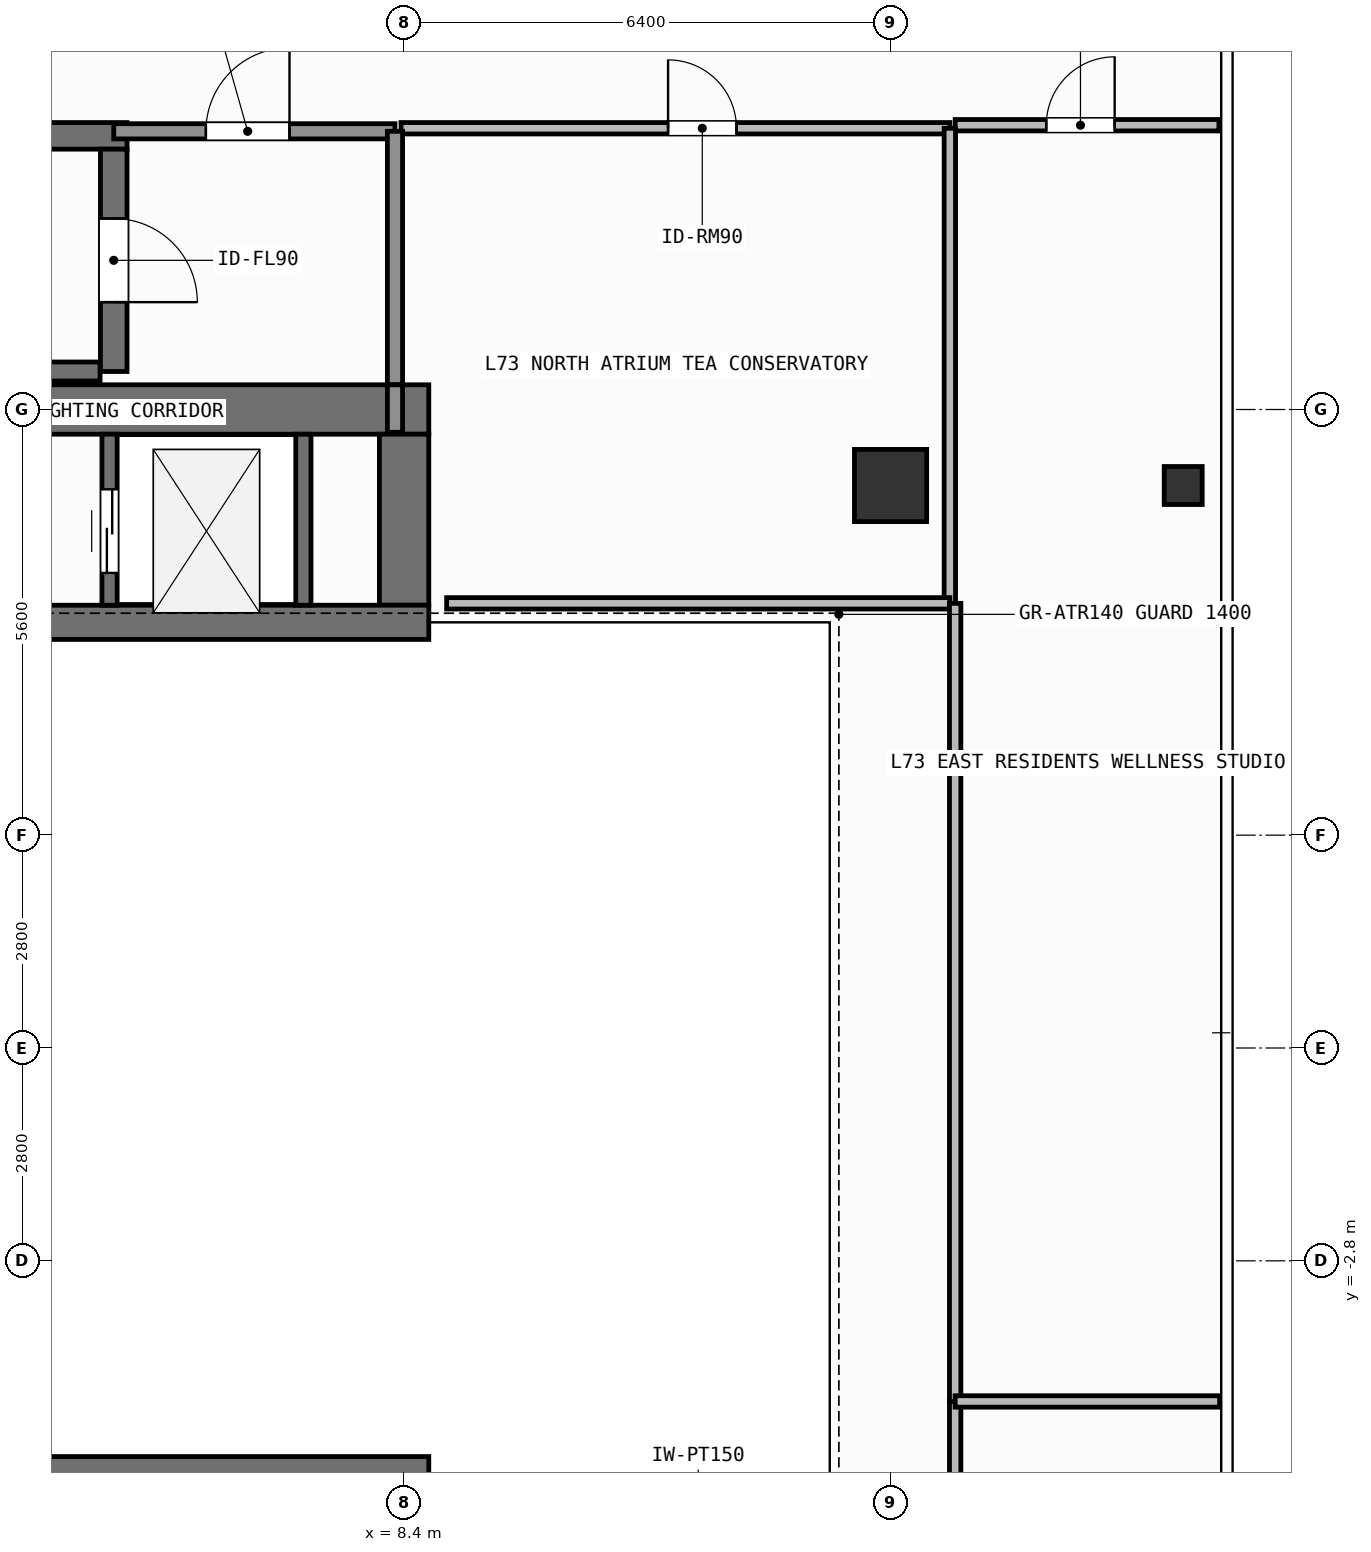
"""IFC4 building model, lengths in metres.
Left out: names, types, materials, properties, quantities, classifications, styles, units other than length and angle.
Written with IfcOpenShell. Run it as: python <this file> out.ifc"""

import sys

from ifc_helpers import new_model, si_unit, direction, frame, frame_2d, origin, origin_2d, place, context, subcontext, project, spatial, rectangle, hollow_rectangle, extrude, element, fill, save


model = new_model("IFC4")
c1 = context("Model", 3, precision=1e-05, world=origin(), true_north=direction((0.0, 1.0)))
c2 = subcontext(c1, "Body", "Model", "MODEL_VIEW")
j1 = project(units=[si_unit("LENGTHUNIT", "METRE"), si_unit("PLANEANGLEUNIT", "RADIAN")], contexts=[c1])
p1 = place(None, origin())
s1 = spatial("IfcSite", under=j1, at=p1, CompositionType="ELEMENT")
p2 = place(p1, origin())
s2 = spatial("IfcBuilding", under=s1, at=p2, CompositionType="ELEMENT")
p3 = place(p2, frame((0.0, 0.0, 297.6)))
s3 = spatial("IfcBuildingStorey", under=s2, at=p3, CompositionType="ELEMENT", Elevation=297.6)
p4 = place(p3, frame((-7.55, 8.4, 0.0), z_axis=(0.0, 0.0, 1.0), x_axis=(1.0, 0.0, 0.0)))
e1 = element("IfcWall", 1, at=p4, inside=s3, PredefinedType="SHEAR", context=c2, shape_type="SweptSolid", body=[
    extrude(rectangle(XDim=16.275, YDim=0.65, at=frame_2d((8.138, 0.0))), origin(), (0.0, 0.0, 1.0), 3.9),
])
p5 = place(p3, frame((8.4, 5.825, 0.0), z_axis=(0.0, 0.0, 1.0), x_axis=(0.0, 1.0, 0.0)))
e2 = element("IfcWall", 2, at=p5, inside=s3, PredefinedType="SHEAR", context=c2, shape_type="SweptSolid", body=[
    extrude(rectangle(XDim=2.25, YDim=0.65, at=frame_2d((1.125, 0.0))), origin(), (0.0, 0.0, 1.0), 3.9),
])
for number, where, z_axis, x_axis in (
    (3, (3.045, -5.6, 0.0), (0.0, 0.0, 1.0), (1.0, 0.0, 0.0)),
    (4, (3.045, 5.6, 0.0), (0.0, 0.0, 1.0), (1.0, 0.0, 0.0)),
):
    element("IfcWall", number, at=place(p3, frame(where, z_axis=z_axis, x_axis=x_axis)), inside=s3, PredefinedType="SHEAR", context=c2, shape_type="SweptSolid", body=[
        extrude(rectangle(XDim=5.68, YDim=0.45, at=frame_2d((2.84, 0.0))), origin(), (0.0, 0.0, 1.0), 3.9),
    ])
p6 = place(p3, frame((-2.555, 12.0, 0.0), z_axis=(0.0, 0.0, 1.0), x_axis=(1.0, 0.0, 0.0)))
e5 = element("IfcWall", 5, at=p6, inside=s3, PredefinedType="SHEAR", context=c2, shape_type="SweptSolid", body=[
    extrude(rectangle(XDim=7.31, YDim=0.35, at=frame_2d((3.655, 0.0))), origin(), (0.0, 0.0, 1.0), 3.9),
])
p7 = place(p3, frame((-2.2, 8.9, 0.0), z_axis=(0.0, 0.0, 1.0), x_axis=(1.0, 0.0, 0.0)))
e6 = element("IfcWall", 6, at=p7, inside=s3, PredefinedType="SHEAR", context=c2, shape_type="SweptSolid", body=[
    extrude(rectangle(XDim=6.6, YDim=0.25, at=frame_2d((3.3, 0.0))), origin(), (0.0, 0.0, 1.0), 3.9),
])
p8 = place(p3, frame((4.58, 11.825, 0.0), z_axis=(0.0, 0.0, 1.0), x_axis=(0.0, -1.0, 0.0)))
e7 = element("IfcWall", 7, at=p8, inside=s3, PredefinedType="SHEAR", context=c2, shape_type="SweptSolid", body=[
    extrude(rectangle(XDim=2.925, YDim=0.35, at=frame_2d((1.462, 0.0))), origin(), (0.0, 0.0, 1.0), 3.9),
])
p9 = place(p8, frame((0.913, 0.0, 0.0)))
e8 = element("IfcOpeningElement", 8, at=p9, cuts=e7, PredefinedType="OPENING", context=c2, shape_type="SweptSolid", body=[
    extrude(rectangle(XDim=1.1, YDim=2.15, at=frame_2d((0.55, 1.075))), frame((0.0, 0.185, 0.0), z_axis=(0.0, -1.0, 0.0), x_axis=(1.0, 0.0, 0.0)), (0.0, 0.0, 1.0), 0.37),
])
p10 = place(p3, frame((14.8, 7.4, 0.0), z_axis=(0.0, 0.0, 1.0), x_axis=(1.0, 0.0, 0.0)))
e9 = element("IfcColumn", 9, at=p10, inside=s3, PredefinedType="COLUMN", context=c2, shape_type="SweptSolid", body=[
    extrude(rectangle(XDim=0.95, YDim=0.95, at=origin_2d()), origin(), (0.0, 0.0, 1.0), 3.9),
])
p11 = place(p3, frame((18.65, 7.4, 0.0), z_axis=(0.0, 0.0, 1.0), x_axis=(1.0, 0.0, 0.0)))
e10 = element("IfcColumn", 10, at=p11, inside=s3, PredefinedType="COLUMN", context=c2, shape_type="SweptSolid", body=[
    extrude(hollow_rectangle(XDim=0.5, YDim=0.5, WallThickness=0.025, at=origin_2d()), origin(), (0.0, 0.0, 1.0), 3.9),
])
p12 = place(p3, frame((4.525, 5.825, 0.0), z_axis=(0.0, 0.0, 1.0), x_axis=(0.0, 1.0, 0.0)))
e11 = element("IfcWall", 11, at=p12, inside=s3, PredefinedType="SHEAR", context=c2, shape_type="SweptSolid", body=[
    extrude(rectangle(XDim=2.25, YDim=0.2, at=frame_2d((1.125, 0.0))), origin(), (0.0, 0.0, 1.0), 3.68),
])
p13 = place(p12, frame((0.425, 0.0, 0.0)))
e12 = element("IfcOpeningElement", 12, at=p13, cuts=e11, PredefinedType="OPENING", context=c2, shape_type="SweptSolid", body=[
    extrude(rectangle(XDim=1.1, YDim=2.2, at=frame_2d((0.55, 1.1))), frame((0.0, 0.11, 0.0), z_axis=(0.0, -1.0, 0.0), x_axis=(1.0, 0.0, 0.0)), (0.0, 0.0, 1.0), 0.22),
])
p14 = place(p3, frame((7.075, 5.825, 0.0), z_axis=(0.0, 0.0, 1.0), x_axis=(0.0, 1.0, 0.0)))
e13 = element("IfcWall", 13, at=p14, inside=s3, PredefinedType="SHEAR", context=c2, shape_type="SweptSolid", body=[
    extrude(rectangle(XDim=2.25, YDim=0.2, at=frame_2d((1.125, 0.0))), origin(), (0.0, 0.0, 1.0), 3.68),
])
p15 = place(p3, frame((4.58, 12.06, 0.0), z_axis=(0.0, 0.0, 1.0), x_axis=(1.0, 0.0, 0.0)))
e14 = element("IfcWall", 14, at=p15, inside=s3, PredefinedType="SOLIDWALL", context=c2, shape_type="SweptSolid", body=[
    extrude(rectangle(XDim=3.7, YDim=0.2, at=frame_2d((1.85, 0.0))), origin(), (0.0, 0.0, 1.0), 3.68),
])
p16 = place(p15, frame((1.212, 0.0, 0.0)))
e15 = element("IfcOpeningElement", 15, at=p16, cuts=e14, PredefinedType="OPENING", context=c2, shape_type="SweptSolid", body=[
    extrude(rectangle(XDim=1.1, YDim=2.15, at=frame_2d((0.55, 1.075))), frame((0.0, 0.11, 0.0), z_axis=(0.0, -1.0, 0.0), x_axis=(1.0, 0.0, 0.0)), (0.0, 0.0, 1.0), 0.22),
])
p17 = place(p3, frame((8.36, 12.1, 0.0), z_axis=(0.0, 0.0, 1.0), x_axis=(1.0, 0.0, 0.0)))
e16 = element("IfcWall", 16, at=p17, inside=s3, PredefinedType="PARTITIONING", context=c2, shape_type="SweptSolid", body=[
    extrude(rectangle(XDim=7.22, YDim=0.15, at=frame_2d((3.61, 0.0))), origin(), (0.0, 0.0, 1.0), 3.68),
])
p18 = place(p17, frame((3.513, 0.0, 0.0)))
e17 = element("IfcOpeningElement", 17, at=p18, cuts=e16, PredefinedType="OPENING", context=c2, shape_type="SweptSolid", body=[
    extrude(rectangle(XDim=0.9, YDim=2.1, at=frame_2d((0.45, 1.05))), frame((0.0, 0.085, 0.0), z_axis=(0.0, -1.0, 0.0), x_axis=(1.0, 0.0, 0.0)), (0.0, 0.0, 1.0), 0.17),
])
p19 = place(p3, frame((15.65, 12.14, 0.0), z_axis=(0.0, 0.0, 1.0), x_axis=(1.0, 0.0, 0.0)))
e18 = element("IfcWall", 18, at=p19, inside=s3, PredefinedType="PARTITIONING", context=c2, shape_type="SweptSolid", body=[
    extrude(rectangle(XDim=3.47, YDim=0.15, at=frame_2d((1.735, 0.0))), origin(), (0.0, 0.0, 1.0), 3.68),
])
p20 = place(p19, frame((1.198, 0.0, 0.0)))
e19 = element("IfcOpeningElement", 19, at=p20, cuts=e18, PredefinedType="OPENING", context=c2, shape_type="SweptSolid", body=[
    extrude(rectangle(XDim=0.9, YDim=2.1, at=frame_2d((0.45, 1.05))), frame((0.0, 0.085, 0.0), z_axis=(0.0, -1.0, 0.0), x_axis=(1.0, 0.0, 0.0)), (0.0, 0.0, 1.0), 0.17),
])
p21 = place(p3, frame((8.28, 8.725, 0.0), z_axis=(0.0, 0.0, 1.0), x_axis=(0.0, 1.0, 0.0)))
e20 = element("IfcWall", 20, at=p21, inside=s3, PredefinedType="SOLIDWALL", context=c2, shape_type="SweptSolid", body=[
    extrude(rectangle(XDim=3.335, YDim=0.2, at=frame_2d((1.667, 0.0))), origin(), (0.0, 0.0, 1.0), 3.68),
])
p22 = place(p3, frame((8.28, 8.1, 0.0), z_axis=(0.0, 0.0, 1.0), x_axis=(0.0, 1.0, 0.0)))
e21 = element("IfcWall", 21, at=p22, inside=s3, PredefinedType="SOLIDWALL", context=c2, shape_type="SweptSolid", body=[
    extrude(rectangle(XDim=0.625, YDim=0.2, at=frame_2d((0.312, 0.0))), origin(), (0.0, 0.0, 1.0), 3.68),
])
p23 = place(p3, frame((15.58, 5.85, 0.0), z_axis=(0.0, 0.0, 1.0), x_axis=(0.0, 1.0, 0.0)))
e22 = element("IfcWall", 22, at=p23, inside=s3, PredefinedType="PARTITIONING", context=c2, shape_type="SweptSolid", body=[
    extrude(rectangle(XDim=6.25, YDim=0.15, at=frame_2d((3.125, 0.0))), origin(), (0.0, 0.0, 1.0), 3.68),
])
p24 = place(p3, frame((8.96, 5.85, 0.0), z_axis=(0.0, 0.0, 1.0), x_axis=(1.0, 0.0, 0.0)))
e23 = element("IfcWall", 23, at=p24, inside=s3, PredefinedType="PARTITIONING", context=c2, shape_type="SweptSolid", body=[
    extrude(rectangle(XDim=6.62, YDim=0.15, at=frame_2d((3.31, 0.0))), origin(), (0.0, 0.0, 1.0), 3.68),
])
p25 = place(p3, frame((15.65, -5.85, 0.0), z_axis=(0.0, 0.0, 1.0), x_axis=(0.0, 1.0, 0.0)))
e24 = element("IfcWall", 24, at=p25, inside=s3, PredefinedType="PARTITIONING", context=c2, shape_type="SweptSolid", body=[
    extrude(rectangle(XDim=1.2, YDim=0.15, at=frame_2d((0.6, 0.0))), origin(), (0.0, 0.0, 1.0), 3.68),
])
p26 = place(p3, frame((15.65, -4.65, 0.0), z_axis=(0.0, 0.0, 1.0), x_axis=(0.0, 1.0, 0.0)))
e25 = element("IfcWall", 25, at=p26, inside=s3, PredefinedType="PARTITIONING", context=c2, shape_type="SweptSolid", body=[
    extrude(rectangle(XDim=10.5, YDim=0.15, at=frame_2d((5.25, 0.0))), origin(), (0.0, 0.0, 1.0), 3.68),
])
p27 = place(p3, frame((15.65, -4.65, 0.0), z_axis=(0.0, 0.0, 1.0), x_axis=(1.0, 0.0, 0.0)))
e26 = element("IfcWall", 26, at=p27, inside=s3, PredefinedType="PARTITIONING", context=c2, shape_type="SweptSolid", body=[
    extrude(rectangle(XDim=3.48, YDim=0.15, at=frame_2d((1.74, 0.0))), origin(), (0.0, 0.0, 1.0), 3.68),
])
p28 = place(p13, origin())
e27 = element("IfcDoor", 27, at=p28, inside=s3, OperationType="SLIDING_TO_LEFT", PredefinedType="DOOR", context=c2, shape_type="SweptSolid", body=[
    extrude(rectangle(XDim=1.1, YDim=2.2, at=frame_2d((0.55, 1.1))), frame((0.0, 0.025, 0.0), z_axis=(0.0, -1.0, 0.0), x_axis=(1.0, 0.0, 0.0)), (0.0, 0.0, 1.0), 0.05),
])
fill(e12, e27)
p29 = place(p9, origin())
e28 = element("IfcDoor", 28, at=p29, inside=s3, OperationType="SINGLE_SWING_RIGHT", PredefinedType="DOOR", context=c2, shape_type="SweptSolid", body=[
    extrude(rectangle(XDim=1.1, YDim=2.15, at=frame_2d((0.55, 1.075))), frame((0.0, 0.025, 0.0), z_axis=(0.0, -1.0, 0.0), x_axis=(1.0, 0.0, 0.0)), (0.0, 0.0, 1.0), 0.05),
])
fill(e8, e28)
p30 = place(p16, origin())
e29 = element("IfcDoor", 29, at=p30, inside=s3, OperationType="SINGLE_SWING_RIGHT", PredefinedType="DOOR", context=c2, shape_type="SweptSolid", body=[
    extrude(rectangle(XDim=1.1, YDim=2.15, at=frame_2d((0.55, 1.075))), frame((0.0, 0.025, 0.0), z_axis=(0.0, -1.0, 0.0), x_axis=(1.0, 0.0, 0.0)), (0.0, 0.0, 1.0), 0.05),
])
fill(e15, e29)
p31 = place(p18, origin())
e30 = element("IfcDoor", 30, at=p31, inside=s3, OperationType="SINGLE_SWING_LEFT", PredefinedType="DOOR", context=c2, shape_type="SweptSolid", body=[
    extrude(rectangle(XDim=0.9, YDim=2.1, at=frame_2d((0.45, 1.05))), frame((0.0, 0.025, 0.0), z_axis=(0.0, -1.0, 0.0), x_axis=(1.0, 0.0, 0.0)), (0.0, 0.0, 1.0), 0.05),
])
fill(e17, e30)
p32 = place(p20, origin())
e31 = element("IfcDoor", 31, at=p32, inside=s3, OperationType="SINGLE_SWING_RIGHT", PredefinedType="DOOR", context=c2, shape_type="SweptSolid", body=[
    extrude(rectangle(XDim=0.9, YDim=2.1, at=frame_2d((0.45, 1.05))), frame((0.0, 0.025, 0.0), z_axis=(0.0, -1.0, 0.0), x_axis=(1.0, 0.0, 0.0)), (0.0, 0.0, 1.0), 0.05),
])
fill(e19, e31)
save(model, sys.argv[1])
